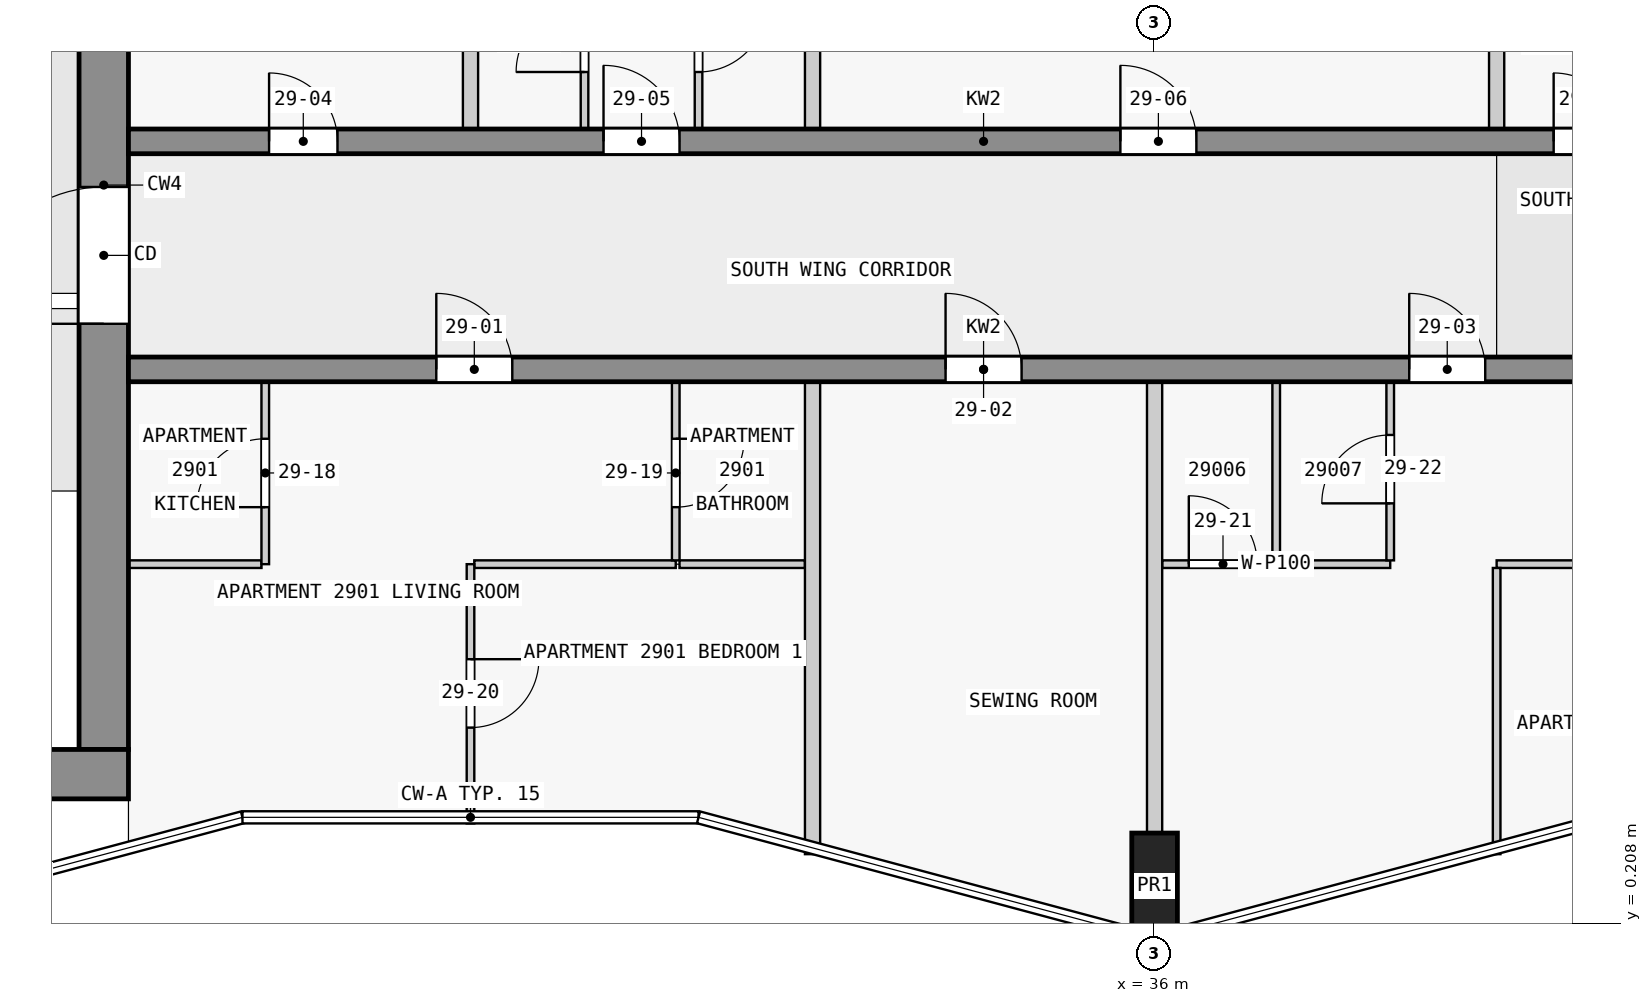
"""IFC4 building model, lengths in metres.
Left out: names, types, materials, properties, quantities, classifications, styles, units other than length and angle.
Written with IfcOpenShell. Run it as: python <this file> out.ifc"""

import sys

from ifc_helpers import new_model, si_unit, direction, frame, frame_2d, origin, origin_2d, place, context, subcontext, project, spatial, rectangle, extrude, element, fill, save


model = new_model("IFC4")
c1 = context("Model", 3, precision=1e-05, world=origin(), true_north=direction((0.0, 1.0)))
c2 = subcontext(c1, "Body", "Model", "MODEL_VIEW")
j1 = project(units=[si_unit("LENGTHUNIT", "METRE"), si_unit("PLANEANGLEUNIT", "RADIAN")], contexts=[c1])
p1 = place(None, origin())
s1 = spatial("IfcSite", under=j1, at=p1, CompositionType="ELEMENT")
p2 = place(p1, origin())
s2 = spatial("IfcBuilding", under=s1, at=p2, CompositionType="ELEMENT")
p3 = place(p2, frame((0.0, 0.0, 113.3)))
s3 = spatial("IfcBuildingStorey", under=s2, at=p3, CompositionType="ELEMENT", Elevation=113.3)
p4 = place(p3, frame((36.0, 0.7, 0.0), z_axis=(0.0, 0.0, 1.0), x_axis=(1.0, 0.0, 0.0)))
e1 = element("IfcColumn", 1, at=p4, inside=s3, PredefinedType="COLUMN", context=c2, shape_type="SweptSolid", body=[
    extrude(rectangle(XDim=0.6, YDim=1.4, at=origin_2d()), origin(), (0.0, 0.0, 1.0), 3.5),
])
p5 = place(p3, frame((1.65, 2.175, 0.0), z_axis=(0.0, 0.0, 1.0), x_axis=(1.0, 0.0, 0.0)))
e2 = element("IfcWall", 2, at=p5, inside=s3, PredefinedType="SHEAR", context=c2, shape_type="SweptSolid", body=[
    extrude(rectangle(XDim=20.85, YDim=0.65, at=frame_2d((10.425, 0.0))), origin(), (0.0, 0.0, 1.0), 3.25),
])
p6 = place(p3, frame((22.175, 2.5, 0.0), z_axis=(0.0, 0.0, 1.0), x_axis=(0.0, 1.0, 0.0)))
e3 = element("IfcWall", 3, at=p6, inside=s3, PredefinedType="SHEAR", context=c2, shape_type="SweptSolid", body=[
    extrude(rectangle(XDim=14.85, YDim=0.65, at=frame_2d((7.425, 0.0))), origin(), (0.0, 0.0, 1.0), 3.25),
])
p7 = place(p6, frame((5.6, 0.0, 0.0)))
e4 = element("IfcOpeningElement", 4, at=p7, cuts=e3, PredefinedType="OPENING", context=c2, shape_type="SweptSolid", body=[
    extrude(rectangle(XDim=1.8, YDim=2.1, at=frame_2d((0.9, 1.05))), frame((0.0, 0.335, 0.0), z_axis=(0.0, -1.0, 0.0), x_axis=(1.0, 0.0, 0.0)), (0.0, 0.0, 1.0), 0.67),
])
p8 = place(p3, frame((22.5, 7.5, 0.0), z_axis=(0.0, 0.0, 1.0), x_axis=(1.0, 0.0, 0.0)))
e5 = element("IfcWall", 5, at=p8, inside=s3, PredefinedType="SHEAR", context=c2, shape_type="SweptSolid", body=[
    extrude(rectangle(XDim=22.5, YDim=0.325, at=frame_2d((11.25, 0.0))), origin(), (0.0, 0.0, 1.0), 3.25),
])
p9 = place(p8, frame((4.05, 0.0, 0.0)))
e6 = element("IfcOpeningElement", 6, at=p9, cuts=e5, PredefinedType="OPENING", context=c2, shape_type="SweptSolid", body=[
    extrude(rectangle(XDim=1.0, YDim=2.1, at=frame_2d((0.5, 1.05))), frame((0.0, 0.172, 0.0), z_axis=(0.0, -1.0, 0.0), x_axis=(1.0, 0.0, 0.0)), (0.0, 0.0, 1.0), 0.345),
])
p10 = place(p8, frame((10.75, 0.0, 0.0)))
e7 = element("IfcOpeningElement", 7, at=p10, cuts=e5, PredefinedType="OPENING", context=c2, shape_type="SweptSolid", body=[
    extrude(rectangle(XDim=1.0, YDim=2.1, at=frame_2d((0.5, 1.05))), frame((0.0, 0.172, 0.0), z_axis=(0.0, -1.0, 0.0), x_axis=(1.0, 0.0, 0.0)), (0.0, 0.0, 1.0), 0.345),
])
p11 = place(p8, frame((16.85, 0.0, 0.0)))
e8 = element("IfcOpeningElement", 8, at=p11, cuts=e5, PredefinedType="OPENING", context=c2, shape_type="SweptSolid", body=[
    extrude(rectangle(XDim=1.0, YDim=2.1, at=frame_2d((0.5, 1.05))), frame((0.0, 0.172, 0.0), z_axis=(0.0, -1.0, 0.0), x_axis=(1.0, 0.0, 0.0)), (0.0, 0.0, 1.0), 0.345),
])
p12 = place(p3, frame((22.5, 10.5, 0.0), z_axis=(0.0, 0.0, 1.0), x_axis=(1.0, 0.0, 0.0)))
e9 = element("IfcWall", 9, at=p12, inside=s3, PredefinedType="SHEAR", context=c2, shape_type="SweptSolid", body=[
    extrude(rectangle(XDim=22.5, YDim=0.325, at=frame_2d((11.25, 0.0))), origin(), (0.0, 0.0, 1.0), 3.25),
])
p13 = place(p12, frame((1.85, 0.0, 0.0)))
e10 = element("IfcOpeningElement", 10, at=p13, cuts=e9, PredefinedType="OPENING", context=c2, shape_type="SweptSolid", body=[
    extrude(rectangle(XDim=0.9, YDim=2.1, at=frame_2d((0.45, 1.05))), frame((0.0, 0.172, 0.0), z_axis=(0.0, -1.0, 0.0), x_axis=(1.0, 0.0, 0.0)), (0.0, 0.0, 1.0), 0.345),
])
p14 = place(p12, frame((6.25, 0.0, 0.0)))
e11 = element("IfcOpeningElement", 11, at=p14, cuts=e9, PredefinedType="OPENING", context=c2, shape_type="SweptSolid", body=[
    extrude(rectangle(XDim=1.0, YDim=2.1, at=frame_2d((0.5, 1.05))), frame((0.0, 0.172, 0.0), z_axis=(0.0, -1.0, 0.0), x_axis=(1.0, 0.0, 0.0)), (0.0, 0.0, 1.0), 0.345),
])
p15 = place(p12, frame((13.05, 0.0, 0.0)))
e12 = element("IfcOpeningElement", 12, at=p15, cuts=e9, PredefinedType="OPENING", context=c2, shape_type="SweptSolid", body=[
    extrude(rectangle(XDim=1.0, YDim=2.1, at=frame_2d((0.5, 1.05))), frame((0.0, 0.172, 0.0), z_axis=(0.0, -1.0, 0.0), x_axis=(1.0, 0.0, 0.0)), (0.0, 0.0, 1.0), 0.345),
])
p16 = place(p12, frame((18.75, 0.0, 0.0)))
e13 = element("IfcOpeningElement", 13, at=p16, cuts=e9, PredefinedType="OPENING", context=c2, shape_type="SweptSolid", body=[
    extrude(rectangle(XDim=0.9, YDim=2.1, at=frame_2d((0.45, 1.05))), frame((0.0, 0.172, 0.0), z_axis=(0.0, -1.0, 0.0), x_axis=(1.0, 0.0, 0.0)), (0.0, 0.0, 1.0), 0.345),
])
p17 = place(p12, frame((20.95, 0.0, 0.0)))
e14 = element("IfcOpeningElement", 14, at=p17, cuts=e9, PredefinedType="OPENING", context=c2, shape_type="SweptSolid", body=[
    extrude(rectangle(XDim=1.0, YDim=2.1, at=frame_2d((0.5, 1.05))), frame((0.0, 0.172, 0.0), z_axis=(0.0, -1.0, 0.0), x_axis=(1.0, 0.0, 0.0)), (0.0, 0.0, 1.0), 0.345),
])
p18 = place(p3, frame((29.7, 4.938, 0.0), z_axis=(0.0, 0.0, 1.0), x_axis=(-1.0, 0.0, 0.0)))
e15 = element("IfcWall", 15, at=p18, inside=s3, PredefinedType="PARTITIONING", context=c2, shape_type="SweptSolid", body=[
    extrude(rectangle(XDim=2.65, YDim=0.1, at=frame_2d((1.325, 0.0))), origin(), (0.0, 0.0, 1.0), 3.25),
])
p19 = place(p3, frame((54.08, 4.938, 0.0), z_axis=(0.0, 0.0, 1.0), x_axis=(-1.0, 0.0, 0.0)))
e16 = element("IfcWall", 16, at=p19, inside=s3, PredefinedType="PARTITIONING", context=c2, shape_type="SweptSolid", body=[
    extrude(rectangle(XDim=13.58, YDim=0.1, at=frame_2d((6.79, 0.0))), origin(), (0.0, 0.0, 1.0), 3.25),
])
p20 = place(p19, frame((10.85, 0.0, 0.0)))
e17 = element("IfcOpeningElement", 17, at=p20, cuts=e16, PredefinedType="OPENING", context=c2, shape_type="SweptSolid", body=[
    extrude(rectangle(XDim=0.9, YDim=2.1, at=frame_2d((0.45, 1.05))), frame((0.0, 0.06, 0.0), z_axis=(0.0, -1.0, 0.0), x_axis=(1.0, 0.0, 0.0)), (0.0, 0.0, 1.0), 0.12),
])
p21 = place(p19, frame((6.45, 0.0, 0.0)))
e18 = element("IfcOpeningElement", 18, at=p21, cuts=e16, PredefinedType="OPENING", context=c2, shape_type="SweptSolid", body=[
    extrude(rectangle(XDim=0.9, YDim=2.1, at=frame_2d((0.45, 1.05))), frame((0.0, 0.06, 0.0), z_axis=(0.0, -1.0, 0.0), x_axis=(1.0, 0.0, 0.0)), (0.0, 0.0, 1.0), 0.12),
])
p22 = place(p19, frame((1.95, 0.0, 0.0)))
e19 = element("IfcOpeningElement", 19, at=p22, cuts=e16, PredefinedType="OPENING", context=c2, shape_type="SweptSolid", body=[
    extrude(rectangle(XDim=0.9, YDim=2.1, at=frame_2d((0.45, 1.05))), frame((0.0, 0.06, 0.0), z_axis=(0.0, -1.0, 0.0), x_axis=(1.0, 0.0, 0.0)), (0.0, 0.0, 1.0), 0.12),
])
p23 = place(p3, frame((22.5, 4.938, 0.0), z_axis=(0.0, 0.0, 1.0), x_axis=(1.0, 0.0, 0.0)))
e20 = element("IfcWall", 20, at=p23, inside=s3, PredefinedType="PARTITIONING", context=c2, shape_type="SweptSolid", body=[
    extrude(rectangle(XDim=1.75, YDim=0.1, at=frame_2d((0.875, 0.0))), origin(), (0.0, 0.0, 1.0), 3.25),
])
p24 = place(p3, frame((29.75, 4.938, 0.0), z_axis=(0.0, 0.0, 1.0), x_axis=(1.0, 0.0, 0.0)))
e21 = element("IfcWall", 21, at=p24, inside=s3, PredefinedType="PARTITIONING", context=c2, shape_type="SweptSolid", body=[
    extrude(rectangle(XDim=1.65, YDim=0.1, at=frame_2d((0.825, 0.0))), origin(), (0.0, 0.0, 1.0), 3.25),
])
p25 = place(p3, frame((36.1, 4.938, 0.0), z_axis=(0.0, 0.0, 1.0), x_axis=(1.0, 0.0, 0.0)))
e22 = element("IfcWall", 22, at=p25, inside=s3, PredefinedType="PARTITIONING", context=c2, shape_type="SweptSolid", body=[
    extrude(rectangle(XDim=3.0, YDim=0.1, at=frame_2d((1.5, 0.0))), origin(), (0.0, 0.0, 1.0), 3.25),
])
p26 = place(p25, frame((0.35, 0.0, 0.0)))
e23 = element("IfcOpeningElement", 23, at=p26, cuts=e22, PredefinedType="OPENING", context=c2, shape_type="SweptSolid", body=[
    extrude(rectangle(XDim=0.9, YDim=2.1, at=frame_2d((0.45, 1.05))), frame((0.0, 0.06, 0.0), z_axis=(0.0, -1.0, 0.0), x_axis=(1.0, 0.0, 0.0)), (0.0, 0.0, 1.0), 0.12),
])
p27 = place(p3, frame((24.3, 4.938, 0.0), z_axis=(0.0, 0.0, 1.0), x_axis=(0.0, 1.0, 0.0)))
e24 = element("IfcWall", 24, at=p27, inside=s3, PredefinedType="PARTITIONING", context=c2, shape_type="SweptSolid", body=[
    extrude(rectangle(XDim=2.4, YDim=0.1, at=frame_2d((1.2, 0.0))), origin(), (0.0, 0.0, 1.0), 3.25),
])
p28 = place(p27, frame((0.75, 0.0, 0.0)))
e25 = element("IfcOpeningElement", 25, at=p28, cuts=e24, PredefinedType="OPENING", context=c2, shape_type="SweptSolid", body=[
    extrude(rectangle(XDim=0.9, YDim=2.1, at=frame_2d((0.45, 1.05))), frame((0.0, 0.06, 0.0), z_axis=(0.0, -1.0, 0.0), x_axis=(1.0, 0.0, 0.0)), (0.0, 0.0, 1.0), 0.12),
])
p29 = place(p3, frame((27.0, 4.938, 0.0), z_axis=(0.0, 0.0, 1.0), x_axis=(0.0, -1.0, 0.0)))
e26 = element("IfcWall", 26, at=p29, inside=s3, PredefinedType="PARTITIONING", context=c2, shape_type="SweptSolid", body=[
    extrude(rectangle(XDim=3.411, YDim=0.1, at=frame_2d((1.705, 0.0))), origin(), (0.0, 0.0, 1.0), 3.25),
])
p30 = place(p29, frame((1.25, 0.0, 0.0)))
e27 = element("IfcOpeningElement", 27, at=p30, cuts=e26, PredefinedType="OPENING", context=c2, shape_type="SweptSolid", body=[
    extrude(rectangle(XDim=0.9, YDim=2.1, at=frame_2d((0.45, 1.05))), frame((0.0, 0.06, 0.0), z_axis=(0.0, -1.0, 0.0), x_axis=(1.0, 0.0, 0.0)), (0.0, 0.0, 1.0), 0.12),
])
p31 = place(p3, frame((27.0, 10.663, 0.0), z_axis=(0.0, 0.0, 1.0), x_axis=(0.0, 1.0, 0.0)))
e28 = element("IfcWall", 28, at=p31, inside=s3, PredefinedType="PARTITIONING", context=c2, shape_type="SweptSolid", body=[
    extrude(rectangle(XDim=5.811, YDim=0.2, at=frame_2d((2.905, 0.0))), origin(), (0.0, 0.0, 1.0), 3.25),
])
p32 = place(p3, frame((28.5, 10.663, 0.0), z_axis=(0.0, 0.0, 1.0), x_axis=(0.0, 1.0, 0.0)))
e29 = element("IfcWall", 29, at=p32, inside=s3, PredefinedType="PARTITIONING", context=c2, shape_type="SweptSolid", body=[
    extrude(rectangle(XDim=2.4, YDim=0.1, at=frame_2d((1.2, 0.0))), origin(), (0.0, 0.0, 1.0), 3.25),
])
p33 = place(p32, frame((0.75, 0.0, 0.0)))
e30 = element("IfcOpeningElement", 30, at=p33, cuts=e29, PredefinedType="OPENING", context=c2, shape_type="SweptSolid", body=[
    extrude(rectangle(XDim=0.9, YDim=2.1, at=frame_2d((0.45, 1.05))), frame((0.0, 0.06, 0.0), z_axis=(0.0, -1.0, 0.0), x_axis=(1.0, 0.0, 0.0)), (0.0, 0.0, 1.0), 0.12),
])
p34 = place(p3, frame((29.7, 7.337, 0.0), z_axis=(0.0, 0.0, 1.0), x_axis=(0.0, -1.0, 0.0)))
e31 = element("IfcWall", 31, at=p34, inside=s3, PredefinedType="PARTITIONING", context=c2, shape_type="SweptSolid", body=[
    extrude(rectangle(XDim=2.35, YDim=0.1, at=frame_2d((1.175, 0.0))), origin(), (0.0, 0.0, 1.0), 3.25),
])
p35 = place(p34, frame((0.75, 0.0, 0.0)))
e32 = element("IfcOpeningElement", 32, at=p35, cuts=e31, PredefinedType="OPENING", context=c2, shape_type="SweptSolid", body=[
    extrude(rectangle(XDim=0.9, YDim=2.1, at=frame_2d((0.45, 1.05))), frame((0.0, 0.06, 0.0), z_axis=(0.0, -1.0, 0.0), x_axis=(1.0, 0.0, 0.0)), (0.0, 0.0, 1.0), 0.12),
])
p36 = place(p3, frame((30.0, 13.062, 0.0), z_axis=(0.0, 0.0, 1.0), x_axis=(0.0, -1.0, 0.0)))
e33 = element("IfcWall", 33, at=p36, inside=s3, PredefinedType="PARTITIONING", context=c2, shape_type="SweptSolid", body=[
    extrude(rectangle(XDim=2.4, YDim=0.1, at=frame_2d((1.2, 0.0))), origin(), (0.0, 0.0, 1.0), 3.25),
])
p37 = place(p36, frame((0.75, 0.0, 0.0)))
e34 = element("IfcOpeningElement", 34, at=p37, cuts=e33, PredefinedType="OPENING", context=c2, shape_type="SweptSolid", body=[
    extrude(rectangle(XDim=0.9, YDim=2.1, at=frame_2d((0.45, 1.05))), frame((0.0, 0.06, 0.0), z_axis=(0.0, -1.0, 0.0), x_axis=(1.0, 0.0, 0.0)), (0.0, 0.0, 1.0), 0.12),
])
p38 = place(p3, frame((31.5, 1.122, 0.0), z_axis=(0.0, 0.0, 1.0), x_axis=(0.0, 1.0, 0.0)))
e35 = element("IfcWall", 35, at=p38, inside=s3, PredefinedType="PARTITIONING", context=c2, shape_type="SweptSolid", body=[
    extrude(rectangle(XDim=6.215, YDim=0.2, at=frame_2d((3.107, 0.0))), origin(), (0.0, 0.0, 1.0), 3.25),
])
p39 = place(p3, frame((31.5, 10.663, 0.0), z_axis=(0.0, 0.0, 1.0), x_axis=(0.0, 1.0, 0.0)))
e36 = element("IfcWall", 36, at=p39, inside=s3, PredefinedType="PARTITIONING", context=c2, shape_type="SweptSolid", body=[
    extrude(rectangle(XDim=2.3, YDim=0.2, at=frame_2d((1.15, 0.0))), origin(), (0.0, 0.0, 1.0), 3.25),
])
p40 = place(p3, frame((36.0, 1.4, 0.0), z_axis=(0.0, 0.0, 1.0), x_axis=(0.0, 1.0, 0.0)))
e37 = element("IfcWall", 37, at=p40, inside=s3, PredefinedType="PARTITIONING", context=c2, shape_type="SweptSolid", body=[
    extrude(rectangle(XDim=5.938, YDim=0.2, at=frame_2d((2.969, 0.0))), origin(), (0.0, 0.0, 1.0), 3.25),
])
p41 = place(p3, frame((37.6, 4.988, 0.0), z_axis=(0.0, 0.0, 1.0), x_axis=(0.0, 1.0, 0.0)))
e38 = element("IfcWall", 38, at=p41, inside=s3, PredefinedType="PARTITIONING", context=c2, shape_type="SweptSolid", body=[
    extrude(rectangle(XDim=2.35, YDim=0.1, at=frame_2d((1.175, 0.0))), origin(), (0.0, 0.0, 1.0), 3.25),
])
p42 = place(p3, frame((39.1, 4.988, 0.0), z_axis=(0.0, 0.0, 1.0), x_axis=(0.0, 1.0, 0.0)))
e39 = element("IfcWall", 39, at=p42, inside=s3, PredefinedType="PARTITIONING", context=c2, shape_type="SweptSolid", body=[
    extrude(rectangle(XDim=2.35, YDim=0.1, at=frame_2d((1.175, 0.0))), origin(), (0.0, 0.0, 1.0), 3.25),
])
p43 = place(p42, frame((0.75, 0.0, 0.0)))
e40 = element("IfcOpeningElement", 40, at=p43, cuts=e39, PredefinedType="OPENING", context=c2, shape_type="SweptSolid", body=[
    extrude(rectangle(XDim=0.9, YDim=2.1, at=frame_2d((0.45, 1.05))), frame((0.0, 0.06, 0.0), z_axis=(0.0, -1.0, 0.0), x_axis=(1.0, 0.0, 0.0)), (0.0, 0.0, 1.0), 0.12),
])
p44 = place(p3, frame((40.5, 4.887, 0.0), z_axis=(0.0, 0.0, 1.0), x_axis=(0.0, -1.0, 0.0)))
e41 = element("IfcWall", 41, at=p44, inside=s3, PredefinedType="PARTITIONING", context=c2, shape_type="SweptSolid", body=[
    extrude(rectangle(XDim=3.765, YDim=0.1, at=frame_2d((1.883, 0.0))), origin(), (0.0, 0.0, 1.0), 3.25),
])
p45 = place(p3, frame((40.5, 10.663, 0.0), z_axis=(0.0, 0.0, 1.0), x_axis=(0.0, 1.0, 0.0)))
e42 = element("IfcWall", 42, at=p45, inside=s3, PredefinedType="PARTITIONING", context=c2, shape_type="SweptSolid", body=[
    extrude(rectangle(XDim=6.215, YDim=0.2, at=frame_2d((3.107, 0.0))), origin(), (0.0, 0.0, 1.0), 3.25),
])
p46 = place(p7, origin())
e43 = element("IfcDoor", 43, at=p46, inside=s3, OperationType="DOUBLE_DOOR_SINGLE_SWING", PredefinedType="DOOR", context=c2, shape_type="SweptSolid", body=[
    extrude(rectangle(XDim=1.8, YDim=2.1, at=frame_2d((0.9, 1.05))), frame((0.0, 0.025, 0.0), z_axis=(0.0, -1.0, 0.0), x_axis=(1.0, 0.0, 0.0)), (0.0, 0.0, 1.0), 0.05),
])
fill(e4, e43)
p47 = place(p9, origin())
e44 = element("IfcDoor", 44, at=p47, inside=s3, OperationType="SINGLE_SWING_LEFT", PredefinedType="DOOR", context=c2, shape_type="SweptSolid", body=[
    extrude(rectangle(XDim=1.0, YDim=2.1, at=frame_2d((0.5, 1.05))), frame((0.0, 0.025, 0.0), z_axis=(0.0, -1.0, 0.0), x_axis=(1.0, 0.0, 0.0)), (0.0, 0.0, 1.0), 0.05),
])
fill(e6, e44)
p48 = place(p10, origin())
e45 = element("IfcDoor", 45, at=p48, inside=s3, OperationType="SINGLE_SWING_LEFT", PredefinedType="DOOR", context=c2, shape_type="SweptSolid", body=[
    extrude(rectangle(XDim=1.0, YDim=2.1, at=frame_2d((0.5, 1.05))), frame((0.0, 0.025, 0.0), z_axis=(0.0, -1.0, 0.0), x_axis=(1.0, 0.0, 0.0)), (0.0, 0.0, 1.0), 0.05),
])
fill(e7, e45)
p49 = place(p11, origin())
e46 = element("IfcDoor", 46, at=p49, inside=s3, OperationType="SINGLE_SWING_RIGHT", PredefinedType="DOOR", context=c2, shape_type="SweptSolid", body=[
    extrude(rectangle(XDim=1.0, YDim=2.1, at=frame_2d((0.5, 1.05))), frame((0.0, 0.025, 0.0), z_axis=(0.0, -1.0, 0.0), x_axis=(1.0, 0.0, 0.0)), (0.0, 0.0, 1.0), 0.05),
])
fill(e8, e46)
p50 = place(p13, origin())
e47 = element("IfcDoor", 47, at=p50, inside=s3, OperationType="SINGLE_SWING_LEFT", PredefinedType="DOOR", context=c2, shape_type="SweptSolid", body=[
    extrude(rectangle(XDim=0.9, YDim=2.1, at=frame_2d((0.45, 1.05))), frame((0.0, 0.025, 0.0), z_axis=(0.0, -1.0, 0.0), x_axis=(1.0, 0.0, 0.0)), (0.0, 0.0, 1.0), 0.05),
])
fill(e10, e47)
p51 = place(p14, origin())
e48 = element("IfcDoor", 48, at=p51, inside=s3, OperationType="SINGLE_SWING_LEFT", PredefinedType="DOOR", context=c2, shape_type="SweptSolid", body=[
    extrude(rectangle(XDim=1.0, YDim=2.1, at=frame_2d((0.5, 1.05))), frame((0.0, 0.025, 0.0), z_axis=(0.0, -1.0, 0.0), x_axis=(1.0, 0.0, 0.0)), (0.0, 0.0, 1.0), 0.05),
])
fill(e11, e48)
p52 = place(p15, origin())
e49 = element("IfcDoor", 49, at=p52, inside=s3, OperationType="SINGLE_SWING_RIGHT", PredefinedType="DOOR", context=c2, shape_type="SweptSolid", body=[
    extrude(rectangle(XDim=1.0, YDim=2.1, at=frame_2d((0.5, 1.05))), frame((0.0, 0.025, 0.0), z_axis=(0.0, -1.0, 0.0), x_axis=(1.0, 0.0, 0.0)), (0.0, 0.0, 1.0), 0.05),
])
fill(e12, e49)
p53 = place(p16, origin())
e50 = element("IfcDoor", 50, at=p53, inside=s3, OperationType="SINGLE_SWING_RIGHT", PredefinedType="DOOR", context=c2, shape_type="SweptSolid", body=[
    extrude(rectangle(XDim=0.9, YDim=2.1, at=frame_2d((0.45, 1.05))), frame((0.0, 0.025, 0.0), z_axis=(0.0, -1.0, 0.0), x_axis=(1.0, 0.0, 0.0)), (0.0, 0.0, 1.0), 0.05),
])
fill(e13, e50)
p54 = place(p28, origin())
e51 = element("IfcDoor", 51, at=p54, inside=s3, OperationType="SINGLE_SWING_LEFT", PredefinedType="DOOR", context=c2, shape_type="SweptSolid", body=[
    extrude(rectangle(XDim=0.9, YDim=2.1, at=frame_2d((0.45, 1.05))), frame((0.0, 0.025, 0.0), z_axis=(0.0, -1.0, 0.0), x_axis=(1.0, 0.0, 0.0)), (0.0, 0.0, 1.0), 0.05),
])
fill(e25, e51)
p55 = place(p35, origin())
e52 = element("IfcDoor", 52, at=p55, inside=s3, OperationType="SINGLE_SWING_RIGHT", PredefinedType="DOOR", context=c2, shape_type="SweptSolid", body=[
    extrude(rectangle(XDim=0.9, YDim=2.1, at=frame_2d((0.45, 1.05))), frame((0.0, 0.025, 0.0), z_axis=(0.0, -1.0, 0.0), x_axis=(1.0, 0.0, 0.0)), (0.0, 0.0, 1.0), 0.05),
])
fill(e32, e52)
p56 = place(p30, origin())
e53 = element("IfcDoor", 53, at=p56, inside=s3, OperationType="SINGLE_SWING_LEFT", PredefinedType="DOOR", context=c2, shape_type="SweptSolid", body=[
    extrude(rectangle(XDim=0.9, YDim=2.1, at=frame_2d((0.45, 1.05))), frame((0.0, 0.025, 0.0), z_axis=(0.0, -1.0, 0.0), x_axis=(1.0, 0.0, 0.0)), (0.0, 0.0, 1.0), 0.05),
])
fill(e27, e53)
p57 = place(p26, origin())
e54 = element("IfcDoor", 54, at=p57, inside=s3, OperationType="SINGLE_SWING_LEFT", PredefinedType="DOOR", context=c2, shape_type="SweptSolid", body=[
    extrude(rectangle(XDim=0.9, YDim=2.1, at=frame_2d((0.45, 1.05))), frame((0.0, 0.025, 0.0), z_axis=(0.0, -1.0, 0.0), x_axis=(1.0, 0.0, 0.0)), (0.0, 0.0, 1.0), 0.05),
])
fill(e23, e54)
p58 = place(p43, origin())
e55 = element("IfcDoor", 55, at=p58, inside=s3, OperationType="SINGLE_SWING_RIGHT", PredefinedType="DOOR", context=c2, shape_type="SweptSolid", body=[
    extrude(rectangle(XDim=0.9, YDim=2.1, at=frame_2d((0.45, 1.05))), frame((0.0, 0.025, 0.0), z_axis=(0.0, -1.0, 0.0), x_axis=(1.0, 0.0, 0.0)), (0.0, 0.0, 1.0), 0.05),
])
fill(e40, e55)
p59 = place(p33, origin())
e56 = element("IfcDoor", 56, at=p59, inside=s3, OperationType="SINGLE_SWING_LEFT", PredefinedType="DOOR", context=c2, shape_type="SweptSolid", body=[
    extrude(rectangle(XDim=0.9, YDim=2.1, at=frame_2d((0.45, 1.05))), frame((0.0, 0.025, 0.0), z_axis=(0.0, -1.0, 0.0), x_axis=(1.0, 0.0, 0.0)), (0.0, 0.0, 1.0), 0.05),
])
fill(e30, e56)
p60 = place(p37, origin())
e57 = element("IfcDoor", 57, at=p60, inside=s3, OperationType="SINGLE_SWING_LEFT", PredefinedType="DOOR", context=c2, shape_type="SweptSolid", body=[
    extrude(rectangle(XDim=0.9, YDim=2.1, at=frame_2d((0.45, 1.05))), frame((0.0, 0.025, 0.0), z_axis=(0.0, -1.0, 0.0), x_axis=(1.0, 0.0, 0.0)), (0.0, 0.0, 1.0), 0.05),
])
fill(e34, e57)
save(model, sys.argv[1])
